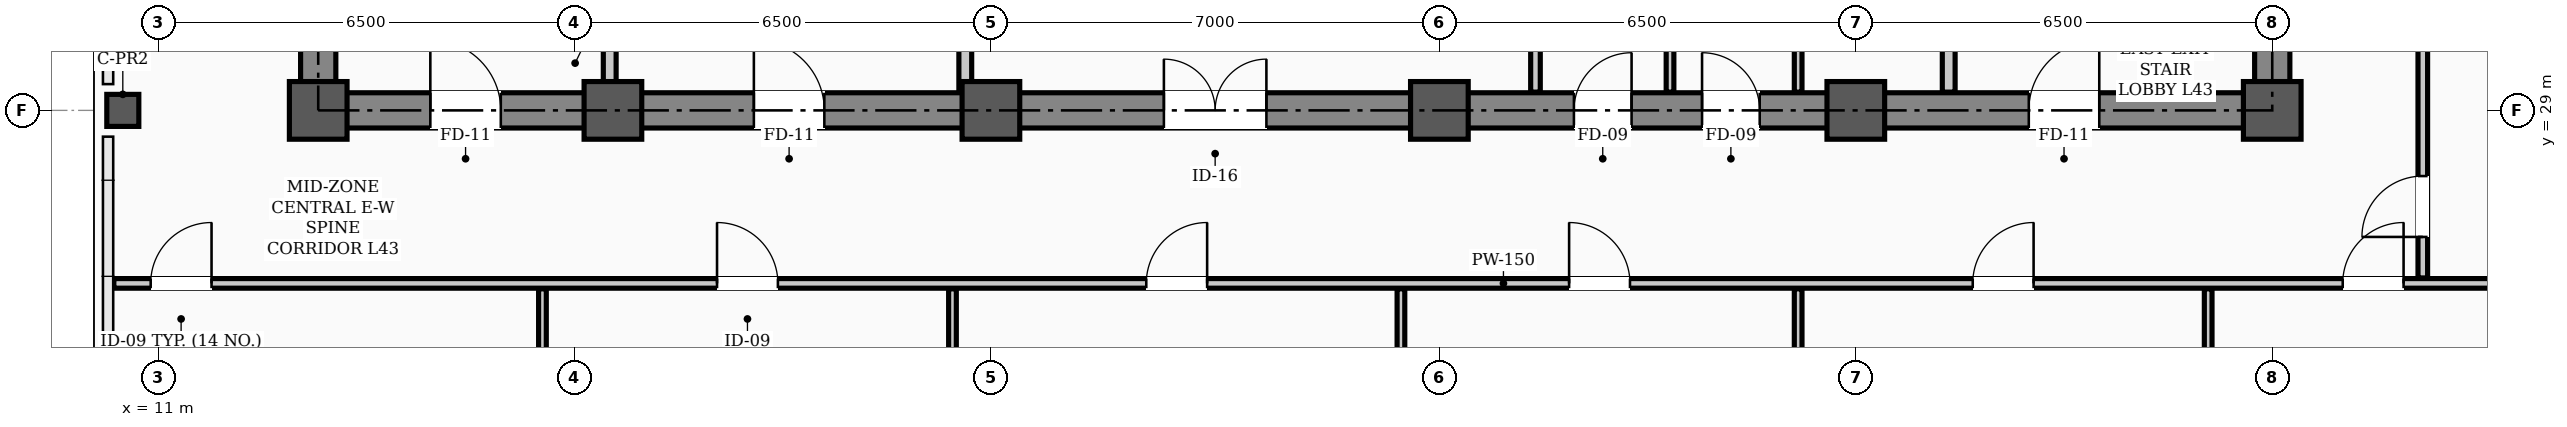
"""IFC4 building model, lengths in metres.
Left out: names, types, materials, properties, quantities, classifications, styles, units other than length and angle.
Written with IfcOpenShell. Run it as: python <this file> out.ifc"""

import sys

from ifc_helpers import new_model, si_unit, direction, frame, frame_2d, origin, origin_2d, place, context, subcontext, project, spatial, rectangle, hollow_rectangle, extrude, element, fill, save


model = new_model("IFC4")
c1 = context("Model", 3, precision=1e-05, world=origin(), true_north=direction((0.0, 1.0)))
c2 = subcontext(c1, "Body", "Model", "MODEL_VIEW")
j1 = project(units=[si_unit("LENGTHUNIT", "METRE"), si_unit("PLANEANGLEUNIT", "RADIAN")], contexts=[c1])
p1 = place(None, origin())
s1 = spatial("IfcSite", under=j1, at=p1, CompositionType="ELEMENT")
p2 = place(p1, origin())
s2 = spatial("IfcBuilding", under=s1, at=p2, CompositionType="ELEMENT")
p3 = place(p2, frame((0.0, 0.0, 173.4)))
s3 = spatial("IfcBuildingStorey", under=s2, at=p3, CompositionType="ELEMENT", Elevation=173.4)
for number, where, z_axis, x_axis in (
    (1, (13.5, 29.0, 0.0), (0.0, 0.0, 1.0), (1.0, 0.0, 0.0)),
    (2, (18.1, 29.0, 0.0), (0.0, 0.0, 1.0), (1.0, 0.0, 0.0)),
    (3, (24.0, 29.0, 0.0), (0.0, 0.0, 1.0), (1.0, 0.0, 0.0)),
    (4, (31.0, 29.0, 0.0), (0.0, 0.0, 1.0), (1.0, 0.0, 0.0)),
    (5, (37.5, 29.0, 0.0), (0.0, 0.0, 1.0), (1.0, 0.0, 0.0)),
    (6, (44.0, 29.0, 0.0), (0.0, 0.0, 1.0), (1.0, 0.0, 0.0)),
):
    element("IfcColumn", number, at=place(p3, frame(where, z_axis=z_axis, x_axis=x_axis)), inside=s3, PredefinedType="COLUMN", context=c2, shape_type="SweptSolid", body=[
        extrude(hollow_rectangle(XDim=0.9, YDim=0.9, WallThickness=0.035, InnerFilletRadius=0.017, OuterFilletRadius=0.052, at=origin_2d()), origin(), (0.0, 0.0, 1.0), 3.9),
    ])
p4 = place(p3, frame((10.45, 29.0, 0.0), z_axis=(0.0, 0.0, 1.0), x_axis=(1.0, 0.0, 0.0)))
e7 = element("IfcColumn", 7, at=p4, inside=s3, PredefinedType="COLUMN", context=c2, shape_type="SweptSolid", body=[
    extrude(hollow_rectangle(XDim=0.5, YDim=0.5, WallThickness=0.024, InnerFilletRadius=0.012, OuterFilletRadius=0.036, at=origin_2d()), origin(), (0.0, 0.0, 1.0), 3.9),
])
p5 = place(p3, frame((13.5, 29.0, 0.0), z_axis=(0.0, 0.0, 1.0), x_axis=(1.0, 0.0, 0.0)))
e8 = element("IfcWall", 8, at=p5, inside=s3, PredefinedType="SHEAR", context=c2, shape_type="SweptSolid", body=[
    extrude(rectangle(XDim=30.5, YDim=0.55, at=frame_2d((15.25, 0.0))), origin(), (0.0, 0.0, 1.0), 3.72),
])
p6 = place(p5, frame((1.75, 0.0, 0.0)))
e9 = element("IfcOpeningElement", 9, at=p6, cuts=e8, PredefinedType="OPENING", context=c2, shape_type="SweptSolid", body=[
    extrude(rectangle(XDim=1.1, YDim=2.08, at=frame_2d((0.55, 1.04))), frame((0.0, 0.285, 0.0), z_axis=(0.0, -1.0, 0.0), x_axis=(1.0, 0.0, 0.0)), (0.0, 0.0, 1.0), 0.57),
])
p7 = place(p5, frame((26.7, 0.0, 0.0)))
e10 = element("IfcOpeningElement", 10, at=p7, cuts=e8, PredefinedType="OPENING", context=c2, shape_type="SweptSolid", body=[
    extrude(rectangle(XDim=1.1, YDim=2.08, at=frame_2d((0.55, 1.04))), frame((0.0, 0.285, 0.0), z_axis=(0.0, -1.0, 0.0), x_axis=(1.0, 0.0, 0.0)), (0.0, 0.0, 1.0), 0.57),
])
p8 = place(p5, frame((6.8, 0.0, 0.0)))
e11 = element("IfcOpeningElement", 11, at=p8, cuts=e8, PredefinedType="OPENING", context=c2, shape_type="SweptSolid", body=[
    extrude(rectangle(XDim=1.1, YDim=2.08, at=frame_2d((0.55, 1.04))), frame((0.0, 0.285, 0.0), z_axis=(0.0, -1.0, 0.0), x_axis=(1.0, 0.0, 0.0)), (0.0, 0.0, 1.0), 0.57),
])
p9 = place(p5, frame((13.2, 0.0, 0.0)))
e12 = element("IfcOpeningElement", 12, at=p9, cuts=e8, PredefinedType="OPENING", context=c2, shape_type="SweptSolid", body=[
    extrude(rectangle(XDim=1.6, YDim=2.08, at=frame_2d((0.8, 1.04))), frame((0.0, 0.285, 0.0), z_axis=(0.0, -1.0, 0.0), x_axis=(1.0, 0.0, 0.0)), (0.0, 0.0, 1.0), 0.57),
])
p10 = place(p5, frame((19.6, 0.0, 0.0)))
e13 = element("IfcOpeningElement", 13, at=p10, cuts=e8, PredefinedType="OPENING", context=c2, shape_type="SweptSolid", body=[
    extrude(rectangle(XDim=0.9, YDim=2.08, at=frame_2d((0.45, 1.04))), frame((0.0, 0.285, 0.0), z_axis=(0.0, -1.0, 0.0), x_axis=(1.0, 0.0, 0.0)), (0.0, 0.0, 1.0), 0.57),
])
p11 = place(p5, frame((21.6, 0.0, 0.0)))
e14 = element("IfcOpeningElement", 14, at=p11, cuts=e8, PredefinedType="OPENING", context=c2, shape_type="SweptSolid", body=[
    extrude(rectangle(XDim=0.9, YDim=2.08, at=frame_2d((0.45, 1.04))), frame((0.0, 0.285, 0.0), z_axis=(0.0, -1.0, 0.0), x_axis=(1.0, 0.0, 0.0)), (0.0, 0.0, 1.0), 0.57),
])
for number, where, z_axis, x_axis in (
    (15, (13.5, 29.35, 0.0), (0.0, 0.0, 1.0), (0.0, 1.0, 0.0)),
    (16, (44.0, 29.35, 0.0), (0.0, 0.0, 1.0), (0.0, 1.0, 0.0)),
):
    element("IfcWall", number, at=place(p3, frame(where, z_axis=z_axis, x_axis=x_axis)), inside=s3, PredefinedType="SHEAR", context=c2, shape_type="SweptSolid", body=[
        extrude(rectangle(XDim=8.6, YDim=0.55, at=frame_2d((4.3, 0.0))), origin(), (0.0, 0.0, 1.0), 3.72),
    ])
p12 = place(p3, frame((10.31, 26.3, 0.0), z_axis=(0.0, 0.0, 1.0), x_axis=(1.0, 0.0, 0.0)))
e17 = element("IfcWall", 17, at=p12, inside=s3, PredefinedType="PARTITIONING", context=c2, shape_type="SweptSolid", body=[
    extrude(rectangle(XDim=43.38, YDim=0.15, at=frame_2d((21.69, 0.0))), origin(), (0.0, 0.0, 1.0), 3.2),
])
p13 = place(p12, frame((0.575, 0.0, 0.0)))
e18 = element("IfcOpeningElement", 18, at=p13, cuts=e17, PredefinedType="OPENING", context=c2, shape_type="SweptSolid", body=[
    extrude(rectangle(XDim=0.95, YDim=2.08, at=frame_2d((0.475, 1.04))), frame((0.0, 0.085, 0.0), z_axis=(0.0, -1.0, 0.0), x_axis=(1.0, 0.0, 0.0)), (0.0, 0.0, 1.0), 0.17),
])
p14 = place(p12, frame((9.415, 0.0, 0.0)))
e19 = element("IfcOpeningElement", 19, at=p14, cuts=e17, PredefinedType="OPENING", context=c2, shape_type="SweptSolid", body=[
    extrude(rectangle(XDim=0.95, YDim=2.08, at=frame_2d((0.475, 1.04))), frame((0.0, 0.085, 0.0), z_axis=(0.0, -1.0, 0.0), x_axis=(1.0, 0.0, 0.0)), (0.0, 0.0, 1.0), 0.17),
])
p15 = place(p12, frame((16.115, 0.0, 0.0)))
e20 = element("IfcOpeningElement", 20, at=p15, cuts=e17, PredefinedType="OPENING", context=c2, shape_type="SweptSolid", body=[
    extrude(rectangle(XDim=0.95, YDim=2.08, at=frame_2d((0.475, 1.04))), frame((0.0, 0.085, 0.0), z_axis=(0.0, -1.0, 0.0), x_axis=(1.0, 0.0, 0.0)), (0.0, 0.0, 1.0), 0.17),
])
p16 = place(p12, frame((22.715, 0.0, 0.0)))
e21 = element("IfcOpeningElement", 21, at=p16, cuts=e17, PredefinedType="OPENING", context=c2, shape_type="SweptSolid", body=[
    extrude(rectangle(XDim=0.95, YDim=2.08, at=frame_2d((0.475, 1.04))), frame((0.0, 0.085, 0.0), z_axis=(0.0, -1.0, 0.0), x_axis=(1.0, 0.0, 0.0)), (0.0, 0.0, 1.0), 0.17),
])
p17 = place(p12, frame((29.015, 0.0, 0.0)))
e22 = element("IfcOpeningElement", 22, at=p17, cuts=e17, PredefinedType="OPENING", context=c2, shape_type="SweptSolid", body=[
    extrude(rectangle(XDim=0.95, YDim=2.08, at=frame_2d((0.475, 1.04))), frame((0.0, 0.085, 0.0), z_axis=(0.0, -1.0, 0.0), x_axis=(1.0, 0.0, 0.0)), (0.0, 0.0, 1.0), 0.17),
])
p18 = place(p12, frame((34.79, 0.0, 0.0)))
e23 = element("IfcOpeningElement", 23, at=p18, cuts=e17, PredefinedType="OPENING", context=c2, shape_type="SweptSolid", body=[
    extrude(rectangle(XDim=0.95, YDim=2.08, at=frame_2d((0.475, 1.04))), frame((0.0, 0.085, 0.0), z_axis=(0.0, -1.0, 0.0), x_axis=(1.0, 0.0, 0.0)), (0.0, 0.0, 1.0), 0.17),
])
for number, where, z_axis, x_axis in (
    (24, (18.05, 29.285, 0.0), (0.0, 0.0, 1.0), (0.0, 1.0, 0.0)),
    (25, (38.95, 29.285, 0.0), (0.0, 0.0, 1.0), (0.0, 1.0, 0.0)),
):
    element("IfcWall", number, at=place(p3, frame(where, z_axis=z_axis, x_axis=x_axis)), inside=s3, PredefinedType="STANDARD", context=c2, shape_type="SweptSolid", body=[
        extrude(rectangle(XDim=1.015, YDim=0.2, at=frame_2d((0.508, 0.0))), origin(), (0.0, 0.0, 1.0), 3.35),
    ])
p19 = place(p3, frame((23.6, 29.285, 0.0), z_axis=(0.0, 0.0, 1.0), x_axis=(0.0, 1.0, 0.0)))
e26 = element("IfcWall", 26, at=p19, inside=s3, PredefinedType="STANDARD", context=c2, shape_type="SweptSolid", body=[
    extrude(rectangle(XDim=5.415, YDim=0.2, at=frame_2d((2.708, 0.0))), origin(), (0.0, 0.0, 1.0), 3.2),
])
p20 = place(p3, frame((32.5, 29.285, 0.0), z_axis=(0.0, 0.0, 1.0), x_axis=(0.0, 1.0, 0.0)))
e27 = element("IfcWall", 27, at=p20, inside=s3, PredefinedType="PARTITIONING", context=c2, shape_type="SweptSolid", body=[
    extrude(rectangle(XDim=2.48, YDim=0.15, at=frame_2d((1.24, 0.0))), origin(), (0.0, 0.0, 1.0), 3.35),
])
for number, where, z_axis, x_axis in (
    (28, (36.6, 29.285, 0.0), (0.0, 0.0, 1.0), (0.0, 1.0, 0.0)),
    (29, (34.6, 29.285, 0.0), (0.0, 0.0, 1.0), (0.0, 1.0, 0.0)),
):
    element("IfcWall", number, at=place(p3, frame(where, z_axis=z_axis, x_axis=x_axis)), inside=s3, PredefinedType="PARTITIONING", context=c2, shape_type="SweptSolid", body=[
        extrude(rectangle(XDim=2.48, YDim=0.12, at=frame_2d((1.24, 0.0))), origin(), (0.0, 0.0, 1.0), 3.35),
    ])
p21 = place(p3, frame((46.35, 26.385, 0.0), z_axis=(0.0, 0.0, 1.0), x_axis=(0.0, 1.0, 0.0)))
e30 = element("IfcWall", 30, at=p21, inside=s3, PredefinedType="PARTITIONING", context=c2, shape_type="SweptSolid", body=[
    extrude(rectangle(XDim=13.58, YDim=0.15, at=frame_2d((6.79, 0.0))), origin(), (0.0, 0.0, 1.0), 3.1),
])
p22 = place(p21, frame((0.64, 0.0, 0.0)))
e31 = element("IfcOpeningElement", 31, at=p22, cuts=e30, PredefinedType="OPENING", context=c2, shape_type="SweptSolid", body=[
    extrude(rectangle(XDim=0.95, YDim=2.08, at=frame_2d((0.475, 1.04))), frame((0.0, 0.085, 0.0), z_axis=(0.0, -1.0, 0.0), x_axis=(1.0, 0.0, 0.0)), (0.0, 0.0, 1.0), 0.17),
])
p23 = place(p21, frame((10.065, 0.0, 0.0)))
e32 = element("IfcOpeningElement", 32, at=p23, cuts=e30, PredefinedType="OPENING", context=c2, shape_type="SweptSolid", body=[
    extrude(rectangle(XDim=0.95, YDim=2.08, at=frame_2d((0.475, 1.04))), frame((0.0, 0.085, 0.0), z_axis=(0.0, -1.0, 0.0), x_axis=(1.0, 0.0, 0.0)), (0.0, 0.0, 1.0), 0.17),
])
p24 = place(p3, frame((17.0, 17.06, 0.0), z_axis=(0.0, 0.0, 1.0), x_axis=(0.0, 1.0, 0.0)))
e33 = element("IfcWall", 33, at=p24, inside=s3, PredefinedType="PARTITIONING", context=c2, shape_type="SweptSolid", body=[
    extrude(rectangle(XDim=9.155, YDim=0.12, at=frame_2d((4.578, 0.0))), origin(), (0.0, 0.0, 1.0), 3.1),
])
p25 = place(p3, frame((23.4, 18.82, 0.0), z_axis=(0.0, 0.0, 1.0), x_axis=(0.0, 1.0, 0.0)))
e34 = element("IfcWall", 34, at=p25, inside=s3, PredefinedType="PARTITIONING", context=c2, shape_type="SweptSolid", body=[
    extrude(rectangle(XDim=7.395, YDim=0.12, at=frame_2d((3.698, 0.0))), origin(), (0.0, 0.0, 1.0), 3.1),
])
for number, where, z_axis, x_axis in (
    (35, (30.4, 17.06, 0.0), (0.0, 0.0, 1.0), (0.0, 1.0, 0.0)),
    (36, (36.6, 17.06, 0.0), (0.0, 0.0, 1.0), (0.0, 1.0, 0.0)),
    (37, (43.0, 17.06, 0.0), (0.0, 0.0, 1.0), (0.0, 1.0, 0.0)),
):
    element("IfcWall", number, at=place(p3, frame(where, z_axis=z_axis, x_axis=x_axis)), inside=s3, PredefinedType="PARTITIONING", context=c2, shape_type="SweptSolid", body=[
        extrude(rectangle(XDim=9.155, YDim=0.12, at=frame_2d((4.578, 0.0))), origin(), (0.0, 0.0, 1.0), 3.1),
    ])
p26 = place(p6, origin())
e38 = element("IfcDoor", 38, at=p26, inside=s3, OperationType="SINGLE_SWING_LEFT", PredefinedType="DOOR", context=c2, shape_type="SweptSolid", body=[
    extrude(rectangle(XDim=1.1, YDim=2.08, at=frame_2d((0.55, 1.04))), frame((0.0, 0.025, 0.0), z_axis=(0.0, -1.0, 0.0), x_axis=(1.0, 0.0, 0.0)), (0.0, 0.0, 1.0), 0.05),
])
fill(e9, e38)
p27 = place(p7, origin())
e39 = element("IfcDoor", 39, at=p27, inside=s3, OperationType="SINGLE_SWING_RIGHT", PredefinedType="DOOR", context=c2, shape_type="SweptSolid", body=[
    extrude(rectangle(XDim=1.1, YDim=2.08, at=frame_2d((0.55, 1.04))), frame((0.0, 0.025, 0.0), z_axis=(0.0, -1.0, 0.0), x_axis=(1.0, 0.0, 0.0)), (0.0, 0.0, 1.0), 0.05),
])
fill(e10, e39)
p28 = place(p8, origin())
e40 = element("IfcDoor", 40, at=p28, inside=s3, OperationType="SINGLE_SWING_LEFT", PredefinedType="DOOR", context=c2, shape_type="SweptSolid", body=[
    extrude(rectangle(XDim=1.1, YDim=2.08, at=frame_2d((0.55, 1.04))), frame((0.0, 0.025, 0.0), z_axis=(0.0, -1.0, 0.0), x_axis=(1.0, 0.0, 0.0)), (0.0, 0.0, 1.0), 0.05),
])
fill(e11, e40)
p29 = place(p9, origin())
e41 = element("IfcDoor", 41, at=p29, inside=s3, OperationType="DOUBLE_DOOR_SINGLE_SWING", PredefinedType="DOOR", context=c2, shape_type="SweptSolid", body=[
    extrude(rectangle(XDim=1.6, YDim=2.08, at=frame_2d((0.8, 1.04))), frame((0.0, 0.025, 0.0), z_axis=(0.0, -1.0, 0.0), x_axis=(1.0, 0.0, 0.0)), (0.0, 0.0, 1.0), 0.05),
])
fill(e12, e41)
p30 = place(p10, origin())
e42 = element("IfcDoor", 42, at=p30, inside=s3, OperationType="SINGLE_SWING_RIGHT", PredefinedType="DOOR", context=c2, shape_type="SweptSolid", body=[
    extrude(rectangle(XDim=0.9, YDim=2.08, at=frame_2d((0.45, 1.04))), frame((0.0, 0.025, 0.0), z_axis=(0.0, -1.0, 0.0), x_axis=(1.0, 0.0, 0.0)), (0.0, 0.0, 1.0), 0.05),
])
fill(e13, e42)
p31 = place(p11, origin())
e43 = element("IfcDoor", 43, at=p31, inside=s3, OperationType="SINGLE_SWING_LEFT", PredefinedType="DOOR", context=c2, shape_type="SweptSolid", body=[
    extrude(rectangle(XDim=0.9, YDim=2.08, at=frame_2d((0.45, 1.04))), frame((0.0, 0.025, 0.0), z_axis=(0.0, -1.0, 0.0), x_axis=(1.0, 0.0, 0.0)), (0.0, 0.0, 1.0), 0.05),
])
fill(e14, e43)
p32 = place(p13, origin())
e44 = element("IfcDoor", 44, at=p32, inside=s3, OperationType="SINGLE_SWING_RIGHT", PredefinedType="DOOR", context=c2, shape_type="SweptSolid", body=[
    extrude(rectangle(XDim=0.95, YDim=2.08, at=frame_2d((0.475, 1.04))), frame((0.0, 0.025, 0.0), z_axis=(0.0, -1.0, 0.0), x_axis=(1.0, 0.0, 0.0)), (0.0, 0.0, 1.0), 0.05),
])
fill(e18, e44)
p33 = place(p14, origin())
e45 = element("IfcDoor", 45, at=p33, inside=s3, OperationType="SINGLE_SWING_LEFT", PredefinedType="DOOR", context=c2, shape_type="SweptSolid", body=[
    extrude(rectangle(XDim=0.95, YDim=2.08, at=frame_2d((0.475, 1.04))), frame((0.0, 0.025, 0.0), z_axis=(0.0, -1.0, 0.0), x_axis=(1.0, 0.0, 0.0)), (0.0, 0.0, 1.0), 0.05),
])
fill(e19, e45)
p34 = place(p15, origin())
e46 = element("IfcDoor", 46, at=p34, inside=s3, OperationType="SINGLE_SWING_RIGHT", PredefinedType="DOOR", context=c2, shape_type="SweptSolid", body=[
    extrude(rectangle(XDim=0.95, YDim=2.08, at=frame_2d((0.475, 1.04))), frame((0.0, 0.025, 0.0), z_axis=(0.0, -1.0, 0.0), x_axis=(1.0, 0.0, 0.0)), (0.0, 0.0, 1.0), 0.05),
])
fill(e20, e46)
p35 = place(p16, origin())
e47 = element("IfcDoor", 47, at=p35, inside=s3, OperationType="SINGLE_SWING_LEFT", PredefinedType="DOOR", context=c2, shape_type="SweptSolid", body=[
    extrude(rectangle(XDim=0.95, YDim=2.08, at=frame_2d((0.475, 1.04))), frame((0.0, 0.025, 0.0), z_axis=(0.0, -1.0, 0.0), x_axis=(1.0, 0.0, 0.0)), (0.0, 0.0, 1.0), 0.05),
])
fill(e21, e47)
p36 = place(p17, origin())
e48 = element("IfcDoor", 48, at=p36, inside=s3, OperationType="SINGLE_SWING_RIGHT", PredefinedType="DOOR", context=c2, shape_type="SweptSolid", body=[
    extrude(rectangle(XDim=0.95, YDim=2.08, at=frame_2d((0.475, 1.04))), frame((0.0, 0.025, 0.0), z_axis=(0.0, -1.0, 0.0), x_axis=(1.0, 0.0, 0.0)), (0.0, 0.0, 1.0), 0.05),
])
fill(e22, e48)
p37 = place(p18, origin())
e49 = element("IfcDoor", 49, at=p37, inside=s3, OperationType="SINGLE_SWING_RIGHT", PredefinedType="DOOR", context=c2, shape_type="SweptSolid", body=[
    extrude(rectangle(XDim=0.95, YDim=2.08, at=frame_2d((0.475, 1.04))), frame((0.0, 0.025, 0.0), z_axis=(0.0, -1.0, 0.0), x_axis=(1.0, 0.0, 0.0)), (0.0, 0.0, 1.0), 0.05),
])
fill(e23, e49)
p38 = place(p22, origin())
e50 = element("IfcDoor", 50, at=p38, inside=s3, OperationType="SINGLE_SWING_LEFT", PredefinedType="DOOR", context=c2, shape_type="SweptSolid", body=[
    extrude(rectangle(XDim=0.95, YDim=2.08, at=frame_2d((0.475, 1.04))), frame((0.0, 0.025, 0.0), z_axis=(0.0, -1.0, 0.0), x_axis=(1.0, 0.0, 0.0)), (0.0, 0.0, 1.0), 0.05),
])
fill(e31, e50)
save(model, sys.argv[1])
